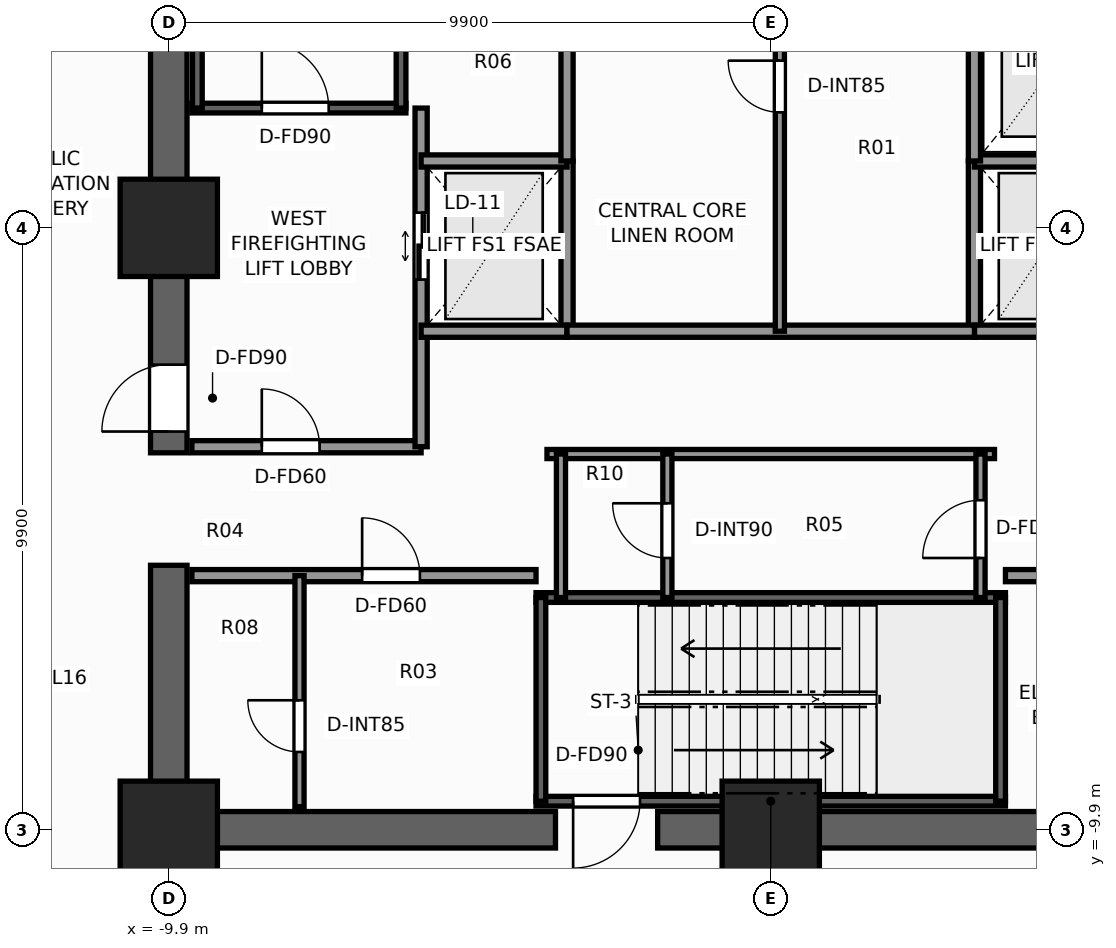
"""IFC4 building model, lengths in metres.
Left out: names, types, materials, properties, quantities, classifications, styles, units other than length and angle.
Written with IfcOpenShell. Run it as: python <this file> out.ifc"""

import sys

from ifc_helpers import new_model, si_unit, direction, frame, frame_2d, origin, origin_2d, place, context, subcontext, project, spatial, rectangle, extrude, element, fill, save


model = new_model("IFC4")
c1 = context("Model", 3, precision=1e-05, world=origin(), true_north=direction((0.0, 1.0)))
c2 = subcontext(c1, "Body", "Model", "MODEL_VIEW")
j1 = project(units=[si_unit("LENGTHUNIT", "METRE"), si_unit("PLANEANGLEUNIT", "RADIAN")], contexts=[c1])
p1 = place(None, origin())
s1 = spatial("IfcSite", under=j1, at=p1, CompositionType="ELEMENT")
p2 = place(p1, origin())
s2 = spatial("IfcBuilding", under=s1, at=p2, CompositionType="ELEMENT")
p3 = place(p2, frame((0.0, 0.0, 10.0)))
s3 = spatial("IfcBuildingStorey", under=s2, at=p3, CompositionType="ELEMENT", Elevation=10.0)
p4 = place(p3, frame((10.2, -9.9, 0.0), z_axis=(0.0, 0.0, 1.0), x_axis=(-1.0, 0.0, 0.0)))
e1 = element("IfcWall", 1, at=p4, inside=s3, PredefinedType="SHEAR", context=c2, shape_type="SweptSolid", body=[
    extrude(rectangle(XDim=12.06, YDim=0.6, at=frame_2d((6.03, 0.0))), origin(), (0.0, 0.0, 1.0), 5.2),
])
p5 = place(p3, frame((-3.54, -9.9, 0.0), z_axis=(0.0, 0.0, 1.0), x_axis=(-1.0, 0.0, 0.0)))
e2 = element("IfcWall", 2, at=p5, inside=s3, PredefinedType="SHEAR", context=c2, shape_type="SweptSolid", body=[
    extrude(rectangle(XDim=6.66, YDim=0.6, at=frame_2d((3.33, 0.0))), origin(), (0.0, 0.0, 1.0), 5.2),
])
p6 = place(p3, frame((-9.9, -9.6, 0.0), z_axis=(0.0, 0.0, 1.0), x_axis=(0.0, 1.0, 0.0)))
e3 = element("IfcWall", 3, at=p6, inside=s3, PredefinedType="SHEAR", context=c2, shape_type="SweptSolid", body=[
    extrude(rectangle(XDim=4.05, YDim=0.6, at=frame_2d((2.025, 0.0))), origin(), (0.0, 0.0, 1.0), 5.2),
])
p7 = place(p3, frame((-9.9, -3.7, 0.0), z_axis=(0.0, 0.0, 1.0), x_axis=(0.0, 1.0, 0.0)))
e4 = element("IfcWall", 4, at=p7, inside=s3, PredefinedType="SHEAR", context=c2, shape_type="SweptSolid", body=[
    extrude(rectangle(XDim=13.3, YDim=0.6, at=frame_2d((6.65, 0.0))), origin(), (0.0, 0.0, 1.0), 5.2),
])
p8 = place(p7, frame((0.35, 0.0, 0.0)))
e5 = element("IfcOpeningElement", 5, at=p8, cuts=e4, PredefinedType="OPENING", context=c2, shape_type="SweptSolid", body=[
    extrude(rectangle(XDim=1.1, YDim=2.2, at=frame_2d((0.55, 1.1))), frame((0.0, 0.31, 0.0), z_axis=(0.0, -1.0, 0.0), x_axis=(1.0, 0.0, 0.0)), (0.0, 0.0, 1.0), 0.62),
])
for number, where, z_axis, x_axis in (
    (6, (-9.9, -9.9, 0.0), (0.0, 0.0, 1.0), (1.0, 0.0, 0.0)),
    (7, (0.0, -9.9, 0.0), (0.0, 0.0, 1.0), (1.0, 0.0, 0.0)),
    (8, (-9.9, 0.0, 0.0), (0.0, 0.0, 1.0), (1.0, 0.0, 0.0)),
):
    element("IfcColumn", number, at=place(p3, frame(where, z_axis=z_axis, x_axis=x_axis)), inside=s3, PredefinedType="COLUMN", context=c2, shape_type="SweptSolid", body=[
        extrude(rectangle(XDim=1.6, YDim=1.6, at=origin_2d()), origin(), (0.0, 0.0, 1.0), 5.2),
    ])
p9 = place(p3, frame((-9.52, 1.97, 0.0), z_axis=(0.0, 0.0, 1.0), x_axis=(1.0, 0.0, 0.0)))
e9 = element("IfcWall", 9, at=p9, inside=s3, PredefinedType="SHEAR", context=c2, shape_type="SweptSolid", body=[
    extrude(rectangle(XDim=3.52, YDim=0.16, at=frame_2d((1.76, 0.0))), origin(), (0.0, 0.0, 1.0), 5.2),
])
p10 = place(p9, frame((1.15, 0.0, 0.0)))
e10 = element("IfcOpeningElement", 10, at=p10, cuts=e9, PredefinedType="OPENING", context=c2, shape_type="SweptSolid", body=[
    extrude(rectangle(XDim=1.1, YDim=2.2, at=frame_2d((0.55, 1.1))), frame((0.0, 0.09, 0.0), z_axis=(0.0, -1.0, 0.0), x_axis=(1.0, 0.0, 0.0)), (0.0, 0.0, 1.0), 0.18),
])
for number, where, z_axis, x_axis in (
    (11, (-9.43, 1.97, 0.0), (0.0, 0.0, 1.0), (0.0, 1.0, 0.0)),
    (12, (-6.08, 1.97, 0.0), (0.0, 0.0, 1.0), (0.0, 1.0, 0.0)),
):
    element("IfcWall", number, at=place(p3, frame(where, z_axis=z_axis, x_axis=x_axis)), inside=s3, PredefinedType="SHEAR", context=c2, shape_type="SweptSolid", body=[
        extrude(rectangle(XDim=7.56, YDim=0.16, at=frame_2d((3.78, 0.0))), origin(), (0.0, 0.0, 1.0), 5.2),
    ])
p11 = place(p3, frame((3.86, -9.43, 0.0), z_axis=(0.0, 0.0, 1.0), x_axis=(-1.0, 0.0, 0.0)))
e13 = element("IfcWall", 13, at=p11, inside=s3, PredefinedType="SHEAR", context=c2, shape_type="SweptSolid", body=[
    extrude(rectangle(XDim=7.72, YDim=0.16, at=frame_2d((3.86, 0.0))), origin(), (0.0, 0.0, 1.0), 5.2),
])
p12 = place(p11, frame((6.01, 0.0, 0.0)))
e14 = element("IfcOpeningElement", 14, at=p12, cuts=e13, PredefinedType="OPENING", context=c2, shape_type="SweptSolid", body=[
    extrude(rectangle(XDim=1.1, YDim=2.2, at=frame_2d((0.55, 1.1))), frame((0.0, 0.09, 0.0), z_axis=(0.0, -1.0, 0.0), x_axis=(1.0, 0.0, 0.0)), (0.0, 0.0, 1.0), 0.18),
])
p13 = place(p3, frame((-3.86, -6.08, 0.0), z_axis=(0.0, 0.0, 1.0), x_axis=(1.0, 0.0, 0.0)))
e15 = element("IfcWall", 15, at=p13, inside=s3, PredefinedType="SHEAR", context=c2, shape_type="SweptSolid", body=[
    extrude(rectangle(XDim=7.72, YDim=0.16, at=frame_2d((3.86, 0.0))), origin(), (0.0, 0.0, 1.0), 5.2),
])
for number, where, z_axis, x_axis in (
    (16, (-3.78, -9.43, 0.0), (0.0, 0.0, 1.0), (0.0, 1.0, 0.0)),
    (17, (3.78, -9.43, 0.0), (0.0, 0.0, 1.0), (0.0, 1.0, 0.0)),
):
    element("IfcWall", number, at=place(p3, frame(where, z_axis=z_axis, x_axis=x_axis)), inside=s3, PredefinedType="SHEAR", context=c2, shape_type="SweptSolid", body=[
        extrude(rectangle(XDim=3.35, YDim=0.16, at=frame_2d((1.675, 0.0))), origin(), (0.0, 0.0, 1.0), 5.2),
    ])
p14 = place(p3, frame((-9.52, -3.6, 0.0), z_axis=(0.0, 0.0, 1.0), x_axis=(1.0, 0.0, 0.0)))
e18 = element("IfcWall", 18, at=p14, inside=s3, PredefinedType="SOLIDWALL", context=c2, shape_type="SweptSolid", body=[
    extrude(rectangle(XDim=3.77, YDim=0.2, at=frame_2d((1.885, 0.0))), origin(), (0.0, 0.0, 1.0), 4.92),
])
p15 = place(p14, frame((1.15, 0.0, 0.0)))
e19 = element("IfcOpeningElement", 19, at=p15, cuts=e18, PredefinedType="OPENING", context=c2, shape_type="SweptSolid", body=[
    extrude(rectangle(XDim=0.95, YDim=2.06, at=frame_2d((0.475, 1.03))), frame((0.0, 0.11, 0.0), z_axis=(0.0, -1.0, 0.0), x_axis=(1.0, 0.0, 0.0)), (0.0, 0.0, 1.0), 0.22),
])
p16 = place(p3, frame((-5.75, -3.6, 0.0), z_axis=(0.0, 0.0, 1.0), x_axis=(0.0, 1.0, 0.0)))
e20 = element("IfcWall", 20, at=p16, inside=s3, PredefinedType="SOLIDWALL", context=c2, shape_type="SweptSolid", body=[
    extrude(rectangle(XDim=5.57, YDim=0.2, at=frame_2d((2.785, 0.0))), origin(), (0.0, 0.0, 1.0), 4.92),
])
p17 = place(p16, frame((2.75, 0.0, 0.0)))
e21 = element("IfcOpeningElement", 21, at=p17, cuts=e20, PredefinedType="OPENING", context=c2, shape_type="SweptSolid", body=[
    extrude(rectangle(XDim=1.1, YDim=2.2, at=frame_2d((0.55, 1.1))), frame((0.0, 0.11, 0.0), z_axis=(0.0, -1.0, 0.0), x_axis=(1.0, 0.0, 0.0)), (0.0, 0.0, 1.0), 0.22),
])
p18 = place(p3, frame((-3.35, -1.7, 0.0), z_axis=(0.0, 0.0, 1.0), x_axis=(0.0, 1.0, 0.0)))
e22 = element("IfcWall", 22, at=p18, inside=s3, PredefinedType="SOLIDWALL", context=c2, shape_type="SweptSolid", body=[
    extrude(rectangle(XDim=2.8, YDim=0.2, at=frame_2d((1.4, 0.0))), origin(), (0.0, 0.0, 1.0), 4.92),
])
for number, where, z_axis, x_axis in (
    (23, (-5.75, -1.7, 0.0), (0.0, 0.0, 1.0), (1.0, 0.0, 0.0)),
    (24, (-5.75, 1.1, 0.0), (0.0, 0.0, 1.0), (1.0, 0.0, 0.0)),
):
    element("IfcWall", number, at=place(p3, frame(where, z_axis=z_axis, x_axis=x_axis)), inside=s3, PredefinedType="SOLIDWALL", context=c2, shape_type="SweptSolid", body=[
        extrude(rectangle(XDim=2.4, YDim=0.2, at=frame_2d((1.2, 0.0))), origin(), (0.0, 0.0, 1.0), 4.92),
    ])
p19 = place(p3, frame((3.35, -1.7, 0.0), z_axis=(0.0, 0.0, 1.0), x_axis=(0.0, 1.0, 0.0)))
e25 = element("IfcWall", 25, at=p19, inside=s3, PredefinedType="SOLIDWALL", context=c2, shape_type="SweptSolid", body=[
    extrude(rectangle(XDim=2.8, YDim=0.2, at=frame_2d((1.4, 0.0))), origin(), (0.0, 0.0, 1.0), 4.92),
])
for number, where, z_axis, x_axis in (
    (26, (3.35, -1.7, 0.0), (0.0, 0.0, 1.0), (1.0, 0.0, 0.0)),
    (27, (3.35, 1.1, 0.0), (0.0, 0.0, 1.0), (1.0, 0.0, 0.0)),
):
    element("IfcWall", number, at=place(p3, frame(where, z_axis=z_axis, x_axis=x_axis)), inside=s3, PredefinedType="SOLIDWALL", context=c2, shape_type="SweptSolid", body=[
        extrude(rectangle(XDim=2.4, YDim=0.2, at=frame_2d((1.2, 0.0))), origin(), (0.0, 0.0, 1.0), 4.92),
    ])
p20 = place(p3, frame((-9.52, -5.72, 0.0), z_axis=(0.0, 0.0, 1.0), x_axis=(1.0, 0.0, 0.0)))
e28 = element("IfcWall", 28, at=p20, inside=s3, PredefinedType="SOLIDWALL", context=c2, shape_type="SweptSolid", body=[
    extrude(rectangle(XDim=5.66, YDim=0.2, at=frame_2d((2.83, 0.0))), origin(), (0.0, 0.0, 1.0), 4.92),
])
p21 = place(p20, frame((2.8, 0.0, 0.0)))
e29 = element("IfcOpeningElement", 29, at=p21, cuts=e28, PredefinedType="OPENING", context=c2, shape_type="SweptSolid", body=[
    extrude(rectangle(XDim=0.95, YDim=2.06, at=frame_2d((0.475, 1.03))), frame((0.0, 0.11, 0.0), z_axis=(0.0, -1.0, 0.0), x_axis=(1.0, 0.0, 0.0)), (0.0, 0.0, 1.0), 0.22),
])
p22 = place(p3, frame((-7.75, -9.52, 0.0), z_axis=(0.0, 0.0, 1.0), x_axis=(0.0, 1.0, 0.0)))
e30 = element("IfcWall", 30, at=p22, inside=s3, PredefinedType="PARTITIONING", context=c2, shape_type="SweptSolid", body=[
    extrude(rectangle(XDim=3.8, YDim=0.15, at=frame_2d((1.9, 0.0))), origin(), (0.0, 0.0, 1.0), 4.92),
])
p23 = place(p22, frame((0.9, 0.0, 0.0)))
e31 = element("IfcOpeningElement", 31, at=p23, cuts=e30, PredefinedType="OPENING", context=c2, shape_type="SweptSolid", body=[
    extrude(rectangle(XDim=0.85, YDim=2.03, at=frame_2d((0.425, 1.015))), frame((0.0, 0.085, 0.0), z_axis=(0.0, -1.0, 0.0), x_axis=(1.0, 0.0, 0.0)), (0.0, 0.0, 1.0), 0.17),
])
p24 = place(p3, frame((3.86, -5.72, 0.0), z_axis=(0.0, 0.0, 1.0), x_axis=(1.0, 0.0, 0.0)))
e32 = element("IfcWall", 32, at=p24, inside=s3, PredefinedType="SOLIDWALL", context=c2, shape_type="SweptSolid", body=[
    extrude(rectangle(XDim=5.66, YDim=0.2, at=frame_2d((2.83, 0.0))), origin(), (0.0, 0.0, 1.0), 4.92),
])
p25 = place(p24, frame((1.2, 0.0, 0.0)))
e33 = element("IfcOpeningElement", 33, at=p25, cuts=e32, PredefinedType="OPENING", context=c2, shape_type="SweptSolid", body=[
    extrude(rectangle(XDim=0.95, YDim=2.06, at=frame_2d((0.475, 1.03))), frame((0.0, 0.11, 0.0), z_axis=(0.0, -1.0, 0.0), x_axis=(1.0, 0.0, 0.0)), (0.0, 0.0, 1.0), 0.22),
])
p26 = place(p3, frame((-3.35, -1.7, 0.0), z_axis=(0.0, 0.0, 1.0), x_axis=(1.0, 0.0, 0.0)))
e34 = element("IfcWall", 34, at=p26, inside=s3, PredefinedType="SOLIDWALL", context=c2, shape_type="SweptSolid", body=[
    extrude(rectangle(XDim=6.7, YDim=0.2, at=frame_2d((3.35, 0.0))), origin(), (0.0, 0.0, 1.0), 4.92),
])
for number, where, z_axis, x_axis in (
    (35, (-3.35, 1.1, 0.0), (0.0, 0.0, 1.0), (0.0, 1.0, 0.0)),
    (36, (3.35, 1.1, 0.0), (0.0, 0.0, 1.0), (0.0, 1.0, 0.0)),
):
    element("IfcWall", number, at=place(p3, frame(where, z_axis=z_axis, x_axis=x_axis)), inside=s3, PredefinedType="SOLIDWALL", context=c2, shape_type="SweptSolid", body=[
        extrude(rectangle(XDim=3.2, YDim=0.2, at=frame_2d((1.6, 0.0))), origin(), (0.0, 0.0, 1.0), 4.92),
    ])
p27 = place(p3, frame((0.15, -1.7, 0.0), z_axis=(0.0, 0.0, 1.0), x_axis=(0.0, 1.0, 0.0)))
e37 = element("IfcWall", 37, at=p27, inside=s3, PredefinedType="PARTITIONING", context=c2, shape_type="SweptSolid", body=[
    extrude(rectangle(XDim=6.0, YDim=0.15, at=frame_2d((3.0, 0.0))), origin(), (0.0, 0.0, 1.0), 4.92),
])
p28 = place(p27, frame((3.6, 0.0, 0.0)))
e38 = element("IfcOpeningElement", 38, at=p28, cuts=e37, PredefinedType="OPENING", context=c2, shape_type="SweptSolid", body=[
    extrude(rectangle(XDim=0.85, YDim=2.03, at=frame_2d((0.425, 1.015))), frame((0.0, 0.085, 0.0), z_axis=(0.0, -1.0, 0.0), x_axis=(1.0, 0.0, 0.0)), (0.0, 0.0, 1.0), 0.17),
])
p29 = place(p3, frame((-3.68, -3.72, 0.0), z_axis=(0.0, 0.0, 1.0), x_axis=(1.0, 0.0, 0.0)))
e39 = element("IfcWall", 39, at=p29, inside=s3, PredefinedType="PARTITIONING", context=c2, shape_type="SweptSolid", body=[
    extrude(rectangle(XDim=7.36, YDim=0.15, at=frame_2d((3.68, 0.0))), origin(), (0.0, 0.0, 1.0), 4.92),
])
p30 = place(p3, frame((3.45, -6.08, 0.0), z_axis=(0.0, 0.0, 1.0), x_axis=(0.0, 1.0, 0.0)))
e40 = element("IfcWall", 40, at=p30, inside=s3, PredefinedType="PARTITIONING", context=c2, shape_type="SweptSolid", body=[
    extrude(rectangle(XDim=2.36, YDim=0.15, at=frame_2d((1.18, 0.0))), origin(), (0.0, 0.0, 1.0), 4.92),
])
p31 = place(p30, frame((0.65, 0.0, 0.0)))
e41 = element("IfcOpeningElement", 41, at=p31, cuts=e40, PredefinedType="OPENING", context=c2, shape_type="SweptSolid", body=[
    extrude(rectangle(XDim=0.95, YDim=2.06, at=frame_2d((0.475, 1.03))), frame((0.0, 0.085, 0.0), z_axis=(0.0, -1.0, 0.0), x_axis=(1.0, 0.0, 0.0)), (0.0, 0.0, 1.0), 0.17),
])
p32 = place(p3, frame((-3.45, -6.08, 0.0), z_axis=(0.0, 0.0, 1.0), x_axis=(0.0, 1.0, 0.0)))
e42 = element("IfcWall", 42, at=p32, inside=s3, PredefinedType="PARTITIONING", context=c2, shape_type="SweptSolid", body=[
    extrude(rectangle(XDim=2.36, YDim=0.15, at=frame_2d((1.18, 0.0))), origin(), (0.0, 0.0, 1.0), 4.92),
])
p33 = place(p3, frame((-1.7, -6.08, 0.0), z_axis=(0.0, 0.0, 1.0), x_axis=(0.0, 1.0, 0.0)))
e43 = element("IfcWall", 43, at=p33, inside=s3, PredefinedType="PARTITIONING", context=c2, shape_type="SweptSolid", body=[
    extrude(rectangle(XDim=2.36, YDim=0.15, at=frame_2d((1.18, 0.0))), origin(), (0.0, 0.0, 1.0), 4.92),
])
p34 = place(p33, frame((0.65, 0.0, 0.0)))
e44 = element("IfcOpeningElement", 44, at=p34, cuts=e43, PredefinedType="OPENING", context=c2, shape_type="SweptSolid", body=[
    extrude(rectangle(XDim=0.9, YDim=2.06, at=frame_2d((0.45, 1.03))), frame((0.0, 0.085, 0.0), z_axis=(0.0, -1.0, 0.0), x_axis=(1.0, 0.0, 0.0)), (0.0, 0.0, 1.0), 0.17),
])
p35 = place(p10, origin())
e45 = element("IfcDoor", 45, at=p35, inside=s3, OperationType="SINGLE_SWING_LEFT", PredefinedType="DOOR", context=c2, shape_type="SweptSolid", body=[
    extrude(rectangle(XDim=1.1, YDim=2.2, at=frame_2d((0.55, 1.1))), frame((0.0, 0.025, 0.0), z_axis=(0.0, -1.0, 0.0), x_axis=(1.0, 0.0, 0.0)), (0.0, 0.0, 1.0), 0.05),
])
fill(e10, e45)
p36 = place(p12, origin())
e46 = element("IfcDoor", 46, at=p36, inside=s3, OperationType="SINGLE_SWING_RIGHT", PredefinedType="DOOR", context=c2, shape_type="SweptSolid", body=[
    extrude(rectangle(XDim=1.1, YDim=2.2, at=frame_2d((0.55, 1.1))), frame((0.0, 0.025, 0.0), z_axis=(0.0, -1.0, 0.0), x_axis=(1.0, 0.0, 0.0)), (0.0, 0.0, 1.0), 0.05),
])
fill(e14, e46)
p37 = place(p8, origin())
e47 = element("IfcDoor", 47, at=p37, inside=s3, OperationType="SINGLE_SWING_LEFT", PredefinedType="DOOR", context=c2, shape_type="SweptSolid", body=[
    extrude(rectangle(XDim=1.1, YDim=2.2, at=frame_2d((0.55, 1.1))), frame((0.0, 0.025, 0.0), z_axis=(0.0, -1.0, 0.0), x_axis=(1.0, 0.0, 0.0)), (0.0, 0.0, 1.0), 0.05),
])
fill(e5, e47)
p38 = place(p17, origin())
e48 = element("IfcDoor", 48, at=p38, inside=s3, OperationType="DOUBLE_DOOR_SLIDING", PredefinedType="DOOR", context=c2, shape_type="SweptSolid", body=[
    extrude(rectangle(XDim=1.1, YDim=2.2, at=frame_2d((0.55, 1.1))), frame((0.0, 0.025, 0.0), z_axis=(0.0, -1.0, 0.0), x_axis=(1.0, 0.0, 0.0)), (0.0, 0.0, 1.0), 0.05),
])
fill(e21, e48)
p39 = place(p21, origin())
e49 = element("IfcDoor", 49, at=p39, inside=s3, OperationType="SINGLE_SWING_LEFT", PredefinedType="DOOR", context=c2, shape_type="SweptSolid", body=[
    extrude(rectangle(XDim=0.95, YDim=2.06, at=frame_2d((0.475, 1.03))), frame((0.0, 0.025, 0.0), z_axis=(0.0, -1.0, 0.0), x_axis=(1.0, 0.0, 0.0)), (0.0, 0.0, 1.0), 0.05),
])
fill(e29, e49)
p40 = place(p23, origin())
e50 = element("IfcDoor", 50, at=p40, inside=s3, OperationType="SINGLE_SWING_RIGHT", PredefinedType="DOOR", context=c2, shape_type="SweptSolid", body=[
    extrude(rectangle(XDim=0.85, YDim=2.03, at=frame_2d((0.425, 1.015))), frame((0.0, 0.025, 0.0), z_axis=(0.0, -1.0, 0.0), x_axis=(1.0, 0.0, 0.0)), (0.0, 0.0, 1.0), 0.05),
])
fill(e31, e50)
p41 = place(p15, origin())
e51 = element("IfcDoor", 51, at=p41, inside=s3, OperationType="SINGLE_SWING_LEFT", PredefinedType="DOOR", context=c2, shape_type="SweptSolid", body=[
    extrude(rectangle(XDim=0.95, YDim=2.06, at=frame_2d((0.475, 1.03))), frame((0.0, 0.025, 0.0), z_axis=(0.0, -1.0, 0.0), x_axis=(1.0, 0.0, 0.0)), (0.0, 0.0, 1.0), 0.05),
])
fill(e19, e51)
p42 = place(p28, origin())
e52 = element("IfcDoor", 52, at=p42, inside=s3, OperationType="SINGLE_SWING_RIGHT", PredefinedType="DOOR", context=c2, shape_type="SweptSolid", body=[
    extrude(rectangle(XDim=0.85, YDim=2.03, at=frame_2d((0.425, 1.015))), frame((0.0, 0.025, 0.0), z_axis=(0.0, -1.0, 0.0), x_axis=(1.0, 0.0, 0.0)), (0.0, 0.0, 1.0), 0.05),
])
fill(e38, e52)
p43 = place(p31, origin())
e53 = element("IfcDoor", 53, at=p43, inside=s3, OperationType="SINGLE_SWING_LEFT", PredefinedType="DOOR", context=c2, shape_type="SweptSolid", body=[
    extrude(rectangle(XDim=0.95, YDim=2.06, at=frame_2d((0.475, 1.03))), frame((0.0, 0.025, 0.0), z_axis=(0.0, -1.0, 0.0), x_axis=(1.0, 0.0, 0.0)), (0.0, 0.0, 1.0), 0.05),
])
fill(e41, e53)
p44 = place(p34, origin())
e54 = element("IfcDoor", 54, at=p44, inside=s3, OperationType="SINGLE_SWING_RIGHT", PredefinedType="DOOR", context=c2, shape_type="SweptSolid", body=[
    extrude(rectangle(XDim=0.9, YDim=2.06, at=frame_2d((0.45, 1.03))), frame((0.0, 0.025, 0.0), z_axis=(0.0, -1.0, 0.0), x_axis=(1.0, 0.0, 0.0)), (0.0, 0.0, 1.0), 0.05),
])
fill(e44, e54)
save(model, sys.argv[1])
